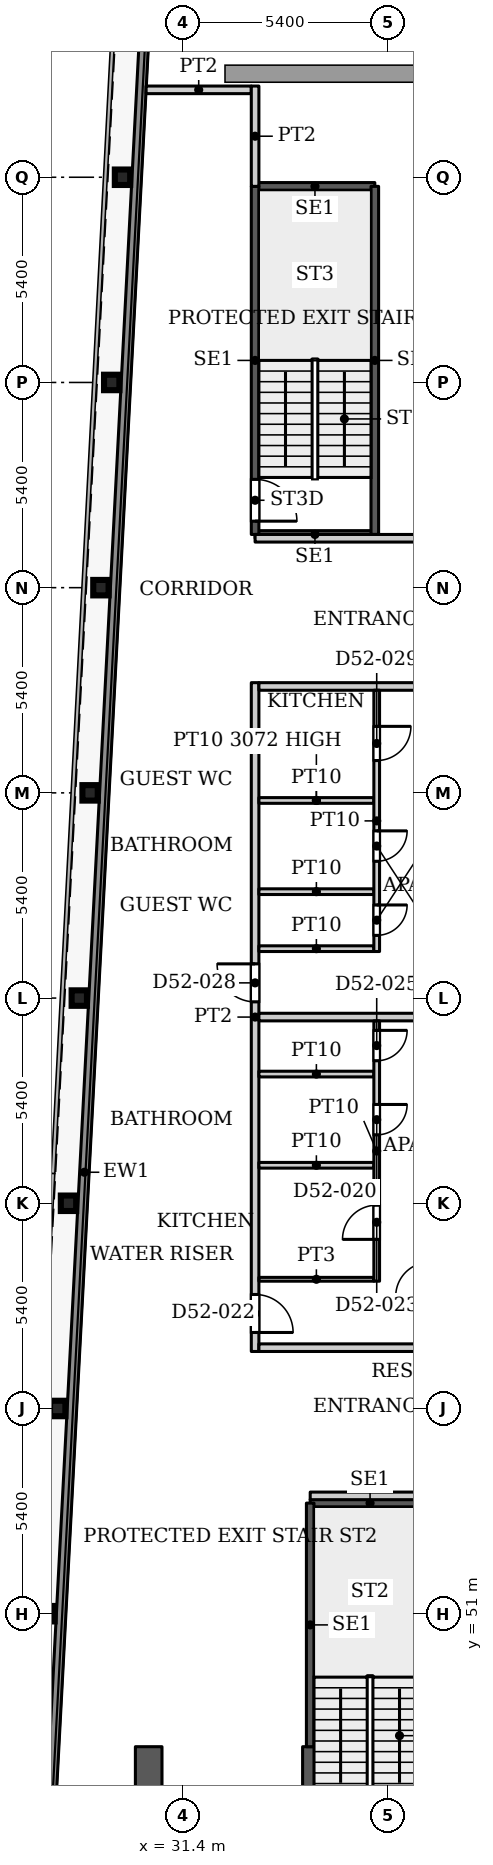
"""IFC4 building model, lengths in metres.
Left out: names, types, materials, properties, quantities, classifications, styles, units other than length and angle.
Written with IfcOpenShell. Run it as: python <this file> out.ifc"""

import sys

from ifc_helpers import new_model, si_unit, direction, frame, frame_2d, origin, origin_2d, place, context, subcontext, project, spatial, rectangle, i_section, extrude, source, transform, mapped, element, fill, save


model = new_model("IFC4")
c1 = context("Model", 3, precision=1e-05, world=origin(), true_north=direction((0.0, 1.0)))
c2 = subcontext(c1, "Body", "Model", "MODEL_VIEW")
j1 = project(units=[si_unit("LENGTHUNIT", "METRE"), si_unit("PLANEANGLEUNIT", "RADIAN")], contexts=[c1])
p1 = place(None, origin())
s1 = spatial("IfcSite", under=j1, at=p1, CompositionType="ELEMENT")
p2 = place(p1, origin())
s2 = spatial("IfcBuilding", under=s1, at=p2, CompositionType="ELEMENT")
p3 = place(p2, frame((0.0, 0.0, 227.9)))
s3 = spatial("IfcBuildingStorey", under=s2, at=p3, CompositionType="ELEMENT", Elevation=227.9)
for number, where, z_axis, x_axis in (
    (1, (27.822, 51.0, 0.0), (0.0, 0.0, 1.0), (1.0, 0.0, 0.0)),
    (2, (28.106, 56.4, 0.0), (0.0, 0.0, 1.0), (1.0, 0.0, 0.0)),
    (3, (28.39, 61.8, 0.0), (0.0, 0.0, 1.0), (1.0, 0.0, 0.0)),
    (4, (28.674, 67.2, 0.0), (0.0, 0.0, 1.0), (1.0, 0.0, 0.0)),
    (5, (28.958, 72.6, 0.0), (0.0, 0.0, 1.0), (1.0, 0.0, 0.0)),
    (6, (29.243, 78.0, 0.0), (0.0, 0.0, 1.0), (1.0, 0.0, 0.0)),
    (7, (29.527, 83.4, 0.0), (0.0, 0.0, 1.0), (1.0, 0.0, 0.0)),
    (8, (29.811, 88.8, 0.0), (0.0, 0.0, 1.0), (1.0, 0.0, 0.0)),
):
    element("IfcColumn", number, at=place(p3, frame(where, z_axis=z_axis, x_axis=x_axis)), inside=s3, PredefinedType="COLUMN", context=c2, shape_type="SweptSolid", body=[
        extrude(i_section(OverallWidth=0.404, OverallDepth=0.407, WebThickness=0.027, FlangeThickness=0.044, FilletRadius=0.012, at=origin_2d()), origin(), (0.0, 0.0, 1.0), 3.9),
    ])
p4 = place(p3, frame((34.75, 29.05, 0.0), z_axis=(0.0, 0.0, 1.0), x_axis=(0.0, 1.0, 0.0)))
e9 = element("IfcWall", 9, at=p4, inside=s3, PredefinedType="SHEAR", context=c2, shape_type="SweptSolid", body=[
    extrude(rectangle(XDim=18.45, YDim=0.4, at=frame_2d((9.225, 0.0))), origin(), (0.0, 0.0, 1.0), 3.9),
])
p5 = place(p4, frame((8.025, 0.0, 0.0)))
e10 = element("IfcOpeningElement", 10, at=p5, cuts=e9, PredefinedType="OPENING", context=c2, shape_type="SweptSolid", body=[
    extrude(rectangle(XDim=1.1, YDim=2.2, at=frame_2d((0.55, 1.1))), frame((0.0, 0.21, 0.0), z_axis=(0.0, -1.0, 0.0), x_axis=(1.0, 0.0, 0.0)), (0.0, 0.0, 1.0), 0.42),
])
p6 = place(p4, frame((10.875, 0.0, 0.0)))
e11 = element("IfcOpeningElement", 11, at=p6, cuts=e9, PredefinedType="OPENING", context=c2, shape_type="SweptSolid", body=[
    extrude(rectangle(XDim=1.1, YDim=2.2, at=frame_2d((0.55, 1.1))), frame((0.0, 0.21, 0.0), z_axis=(0.0, -1.0, 0.0), x_axis=(1.0, 0.0, 0.0)), (0.0, 0.0, 1.0), 0.42),
])
p7 = place(p4, frame((13.725, 0.0, 0.0)))
e12 = element("IfcOpeningElement", 12, at=p7, cuts=e9, PredefinedType="OPENING", context=c2, shape_type="SweptSolid", body=[
    extrude(rectangle(XDim=1.1, YDim=2.2, at=frame_2d((0.55, 1.1))), frame((0.0, 0.21, 0.0), z_axis=(0.0, -1.0, 0.0), x_axis=(1.0, 0.0, 0.0)), (0.0, 0.0, 1.0), 0.42),
])
p8 = place(p4, frame((15.95, 0.0, 0.0)))
e13 = element("IfcOpeningElement", 13, at=p8, cuts=e9, PredefinedType="OPENING", context=c2, shape_type="SweptSolid", body=[
    extrude(rectangle(XDim=1.1, YDim=2.2, at=frame_2d((0.55, 1.1))), frame((0.0, 0.21, 0.0), z_axis=(0.0, -1.0, 0.0), x_axis=(1.0, 0.0, 0.0)), (0.0, 0.0, 1.0), 0.42),
])
p9 = place(p3, frame((30.5, 29.05, 0.0), z_axis=(0.0, 0.0, 1.0), x_axis=(0.0, 1.0, 0.0)))
e14 = element("IfcWall", 14, at=p9, inside=s3, PredefinedType="SHEAR", context=c2, shape_type="SweptSolid", body=[
    extrude(rectangle(XDim=18.45, YDim=0.7, at=frame_2d((9.225, 0.0))), origin(), (0.0, 0.0, 1.0), 3.9),
])
p10 = place(p9, frame((1.5, 0.0, 0.0)))
e15 = element("IfcOpeningElement", 15, at=p10, cuts=e14, PredefinedType="OPENING", context=c2, shape_type="SweptSolid", body=[
    extrude(rectangle(XDim=0.9, YDim=2.2, at=frame_2d((0.45, 1.1))), frame((0.0, 0.36, 0.0), z_axis=(0.0, -1.0, 0.0), x_axis=(1.0, 0.0, 0.0)), (0.0, 0.0, 1.0), 0.72),
])
p11 = place(p9, frame((8.705, 0.0, 0.0)))
e16 = element("IfcOpeningElement", 16, at=p11, cuts=e14, PredefinedType="OPENING", context=c2, shape_type="SweptSolid", body=[
    extrude(rectangle(XDim=0.9, YDim=2.2, at=frame_2d((0.45, 1.1))), frame((0.0, 0.36, 0.0), z_axis=(0.0, -1.0, 0.0), x_axis=(1.0, 0.0, 0.0)), (0.0, 0.0, 1.0), 0.72),
])
p12 = place(p3, frame((27.195, 31.969, 0.0), z_axis=(0.0, 0.0, 1.0), x_axis=(0.052555284099, 0.998618016117, 0.0)))
e17 = element("IfcWall", 17, at=p12, inside=s3, PredefinedType="SOLIDWALL", context=c2, shape_type="SweptSolid", body=[
    extrude(rectangle(XDim=61.38, YDim=0.25, at=frame_2d((30.69, 0.0))), origin(), (0.0, 0.0, 1.0), 3.75),
])
p13 = place(p3, frame((34.75, 53.91, 0.0), z_axis=(0.0, 0.0, 1.0), x_axis=(1.0, 0.0, 0.0)))
e18 = element("IfcWall", 18, at=p13, inside=s3, PredefinedType="SHEAR", context=c2, shape_type="SweptSolid", body=[
    extrude(rectangle(XDim=3.15, YDim=0.2, at=frame_2d((1.575, 0.0))), origin(), (0.0, 0.0, 1.0), 3.9),
])
p14 = place(p3, frame((34.75, 47.5, 0.0), z_axis=(0.0, 0.0, 1.0), x_axis=(0.0, 1.0, 0.0)))
e19 = element("IfcWall", 19, at=p14, inside=s3, PredefinedType="SHEAR", context=c2, shape_type="SweptSolid", body=[
    extrude(rectangle(XDim=6.41, YDim=0.2, at=frame_2d((3.205, 0.0))), origin(), (0.0, 0.0, 1.0), 3.9),
])
for number, where, z_axis, x_axis in (
    (20, (33.3, 79.4, 0.0), (0.0, 0.0, 1.0), (1.0, 0.0, 0.0)),
    (21, (33.3, 88.56, 0.0), (0.0, 0.0, 1.0), (1.0, 0.0, 0.0)),
):
    element("IfcWall", number, at=place(p3, frame(where, z_axis=z_axis, x_axis=x_axis)), inside=s3, PredefinedType="SHEAR", context=c2, shape_type="SweptSolid", body=[
        extrude(rectangle(XDim=3.15, YDim=0.2, at=frame_2d((1.575, 0.0))), origin(), (0.0, 0.0, 1.0), 3.9),
    ])
p15 = place(p3, frame((33.3, 79.4, 0.0), z_axis=(0.0, 0.0, 1.0), x_axis=(0.0, 1.0, 0.0)))
e22 = element("IfcWall", 22, at=p15, inside=s3, PredefinedType="SHEAR", context=c2, shape_type="SweptSolid", body=[
    extrude(rectangle(XDim=9.16, YDim=0.2, at=frame_2d((4.58, 0.0))), origin(), (0.0, 0.0, 1.0), 3.9),
])
p16 = place(p15, frame((0.35, 0.0, 0.0)))
e23 = element("IfcOpeningElement", 23, at=p16, cuts=e22, PredefinedType="OPENING", context=c2, shape_type="SweptSolid", body=[
    extrude(rectangle(XDim=1.1, YDim=2.2, at=frame_2d((0.55, 1.1))), frame((0.0, 0.11, 0.0), z_axis=(0.0, -1.0, 0.0), x_axis=(1.0, 0.0, 0.0)), (0.0, 0.0, 1.0), 0.22),
])
p17 = place(p3, frame((36.45, 79.4, 0.0), z_axis=(0.0, 0.0, 1.0), x_axis=(0.0, 1.0, 0.0)))
e24 = element("IfcWall", 24, at=p17, inside=s3, PredefinedType="SHEAR", context=c2, shape_type="SweptSolid", body=[
    extrude(rectangle(XDim=9.16, YDim=0.2, at=frame_2d((4.58, 0.0))), origin(), (0.0, 0.0, 1.0), 3.9),
])
p18 = place(p3, frame((30.432, 91.1, 0.0), z_axis=(0.0, 0.0, 1.0), x_axis=(1.0, 0.0, 0.0)))
e25 = element("IfcWall", 25, at=p18, inside=s3, PredefinedType="PARTITIONING", context=c2, shape_type="SweptSolid", body=[
    extrude(rectangle(XDim=2.768, YDim=0.2, at=frame_2d((1.384, 0.0))), origin(), (0.0, 0.0, 1.0), 3.6),
])
p19 = place(p3, frame((33.3, 57.9, 0.0), z_axis=(0.0, 0.0, 1.0), x_axis=(0.0, 1.0, 0.0)))
e26 = element("IfcWall", 26, at=p19, inside=s3, PredefinedType="PARTITIONING", context=c2, shape_type="SweptSolid", body=[
    extrude(rectangle(XDim=17.6, YDim=0.2, at=frame_2d((8.8, 0.0))), origin(), (0.0, 0.0, 1.0), 3.6),
])
p20 = place(p19, frame((0.5, 0.0, 0.0)))
e27 = element("IfcOpeningElement", 27, at=p20, cuts=e26, PredefinedType="OPENING", context=c2, shape_type="SweptSolid", body=[
    extrude(rectangle(XDim=1.0, YDim=2.1, at=frame_2d((0.5, 1.05))), frame((0.0, 0.11, 0.0), z_axis=(0.0, -1.0, 0.0), x_axis=(1.0, 0.0, 0.0)), (0.0, 0.0, 1.0), 0.22),
])
p21 = place(p19, frame((9.2, 0.0, 0.0)))
e28 = element("IfcOpeningElement", 28, at=p21, cuts=e26, PredefinedType="OPENING", context=c2, shape_type="SweptSolid", body=[
    extrude(rectangle(XDim=1.0, YDim=2.1, at=frame_2d((0.5, 1.05))), frame((0.0, 0.11, 0.0), z_axis=(0.0, -1.0, 0.0), x_axis=(1.0, 0.0, 0.0)), (0.0, 0.0, 1.0), 0.22),
])
p22 = place(p3, frame((33.3, 79.3, 0.0), z_axis=(0.0, 0.0, 1.0), x_axis=(1.0, 0.0, 0.0)))
e29 = element("IfcWall", 29, at=p22, inside=s3, PredefinedType="PARTITIONING", context=c2, shape_type="SweptSolid", body=[
    extrude(rectangle(XDim=12.6, YDim=0.2, at=frame_2d((6.3, 0.0))), origin(), (0.0, 0.0, 1.0), 3.6),
])
p23 = place(p22, frame((5.795, 0.0, 0.0)))
e30 = element("IfcOpeningElement", 30, at=p23, cuts=e29, PredefinedType="OPENING", context=c2, shape_type="SweptSolid", body=[
    extrude(rectangle(XDim=1.0, YDim=2.1, at=frame_2d((0.5, 1.05))), frame((0.0, 0.11, 0.0), z_axis=(0.0, -1.0, 0.0), x_axis=(1.0, 0.0, 0.0)), (0.0, 0.0, 1.0), 0.22),
])
p24 = place(p3, frame((33.3, 88.56, 0.0), z_axis=(0.0, 0.0, 1.0), x_axis=(0.0, 1.0, 0.0)))
e31 = element("IfcWall", 31, at=p24, inside=s3, PredefinedType="PARTITIONING", context=c2, shape_type="SweptSolid", body=[
    extrude(rectangle(XDim=2.64, YDim=0.2, at=frame_2d((1.32, 0.0))), origin(), (0.0, 0.0, 1.0), 3.6),
])
p25 = place(p3, frame((33.4, 58.0, 0.0), z_axis=(0.0, 0.0, 1.0), x_axis=(1.0, 0.0, 0.0)))
e32 = element("IfcWall", 32, at=p25, inside=s3, PredefinedType="PARTITIONING", context=c2, shape_type="SweptSolid", body=[
    extrude(rectangle(XDim=12.5, YDim=0.2, at=frame_2d((6.25, 0.0))), origin(), (0.0, 0.0, 1.0), 3.6),
])
p26 = place(p3, frame((33.4, 59.8, 0.0), z_axis=(0.0, 0.0, 1.0), x_axis=(1.0, 0.0, 0.0)))
e33 = element("IfcWall", 33, at=p26, inside=s3, PredefinedType="PARTITIONING", context=c2, shape_type="SweptSolid", body=[
    extrude(rectangle(XDim=3.025, YDim=0.1, at=frame_2d((1.513, 0.0))), origin(), (0.0, 0.0, 1.0), 3.6),
])
for number, where, z_axis, x_axis in (
    (34, (33.4, 62.8, 0.0), (0.0, 0.0, 1.0), (1.0, 0.0, 0.0)),
    (35, (33.4, 65.2, 0.0), (0.0, 0.0, 1.0), (1.0, 0.0, 0.0)),
):
    element("IfcWall", number, at=place(p3, frame(where, z_axis=z_axis, x_axis=x_axis)), inside=s3, PredefinedType="PARTITIONING", context=c2, shape_type="SweptSolid", body=[
        extrude(rectangle(XDim=3.025, YDim=0.15, at=frame_2d((1.513, 0.0))), origin(), (0.0, 0.0, 1.0), 3.6),
    ])
p27 = place(p3, frame((33.4, 66.7, 0.0), z_axis=(0.0, 0.0, 1.0), x_axis=(1.0, 0.0, 0.0)))
e36 = element("IfcWall", 36, at=p27, inside=s3, PredefinedType="PARTITIONING", context=c2, shape_type="SweptSolid", body=[
    extrude(rectangle(XDim=12.5, YDim=0.2, at=frame_2d((6.25, 0.0))), origin(), (0.0, 0.0, 1.0), 3.6),
])
for number, where, z_axis, x_axis in (
    (37, (33.4, 68.5, 0.0), (0.0, 0.0, 1.0), (1.0, 0.0, 0.0)),
    (38, (33.4, 70.0, 0.0), (0.0, 0.0, 1.0), (1.0, 0.0, 0.0)),
):
    element("IfcWall", number, at=place(p3, frame(where, z_axis=z_axis, x_axis=x_axis)), inside=s3, PredefinedType="PARTITIONING", context=c2, shape_type="SweptSolid", body=[
        extrude(rectangle(XDim=3.025, YDim=0.15, at=frame_2d((1.513, 0.0))), origin(), (0.0, 0.0, 1.0), 3.6),
    ])
p28 = place(p3, frame((33.4, 72.4, 0.0), z_axis=(0.0, 0.0, 1.0), x_axis=(1.0, 0.0, 0.0)))
e39 = element("IfcWall", 39, at=p28, inside=s3, PredefinedType="PARTITIONING", context=c2, shape_type="SweptSolid", body=[
    extrude(rectangle(XDim=3.025, YDim=0.15, at=frame_2d((1.513, 0.0))), origin(), (0.0, 0.0, 1.0), 3.072),
])
p29 = place(p3, frame((33.4, 75.4, 0.0), z_axis=(0.0, 0.0, 1.0), x_axis=(1.0, 0.0, 0.0)))
e40 = element("IfcWall", 40, at=p29, inside=s3, PredefinedType="PARTITIONING", context=c2, shape_type="SweptSolid", body=[
    extrude(rectangle(XDim=12.5, YDim=0.2, at=frame_2d((6.25, 0.0))), origin(), (0.0, 0.0, 1.0), 3.6),
])
p30 = place(p3, frame((34.75, 54.1, 0.0), z_axis=(0.0, 0.0, 1.0), x_axis=(1.0, 0.0, 0.0)))
e41 = element("IfcWall", 41, at=p30, inside=s3, PredefinedType="PARTITIONING", context=c2, shape_type="SweptSolid", body=[
    extrude(rectangle(XDim=11.15, YDim=0.2, at=frame_2d((5.575, 0.0))), origin(), (0.0, 0.0, 1.0), 3.6),
])
p31 = place(p30, frame((5.075, 0.0, 0.0)))
e42 = element("IfcOpeningElement", 42, at=p31, cuts=e41, PredefinedType="OPENING", context=c2, shape_type="SweptSolid", body=[
    extrude(rectangle(XDim=1.0, YDim=2.1, at=frame_2d((0.5, 1.05))), frame((0.0, 0.11, 0.0), z_axis=(0.0, -1.0, 0.0), x_axis=(1.0, 0.0, 0.0)), (0.0, 0.0, 1.0), 0.22),
])
p32 = place(p3, frame((36.5, 59.75, 0.0), z_axis=(0.0, 0.0, 1.0), x_axis=(0.0, 1.0, 0.0)))
e43 = element("IfcWall", 43, at=p32, inside=s3, PredefinedType="PARTITIONING", context=c2, shape_type="SweptSolid", body=[
    extrude(rectangle(XDim=6.85, YDim=0.15, at=frame_2d((3.425, 0.0))), origin(), (0.0, 0.0, 1.0), 3.6),
])
p33 = place(p32, frame((3.85, 0.0, 0.0)))
e44 = element("IfcOpeningElement", 44, at=p33, cuts=e43, PredefinedType="OPENING", context=c2, shape_type="SweptSolid", body=[
    extrude(rectangle(XDim=0.8, YDim=2.1, at=frame_2d((0.4, 1.05))), frame((0.0, 0.085, 0.0), z_axis=(0.0, -1.0, 0.0), x_axis=(1.0, 0.0, 0.0)), (0.0, 0.0, 1.0), 0.17),
])
p34 = place(p32, frame((1.1, 0.0, 0.0)))
e45 = element("IfcOpeningElement", 45, at=p34, cuts=e43, PredefinedType="OPENING", context=c2, shape_type="SweptSolid", body=[
    extrude(rectangle(XDim=0.9, YDim=2.1, at=frame_2d((0.45, 1.05))), frame((0.0, 0.085, 0.0), z_axis=(0.0, -1.0, 0.0), x_axis=(1.0, 0.0, 0.0)), (0.0, 0.0, 1.0), 0.17),
])
p35 = place(p32, frame((5.8, 0.0, 0.0)))
e46 = element("IfcOpeningElement", 46, at=p35, cuts=e43, PredefinedType="OPENING", context=c2, shape_type="SweptSolid", body=[
    extrude(rectangle(XDim=0.8, YDim=2.1, at=frame_2d((0.4, 1.05))), frame((0.0, 0.085, 0.0), z_axis=(0.0, -1.0, 0.0), x_axis=(1.0, 0.0, 0.0)), (0.0, 0.0, 1.0), 0.17),
])
p36 = place(p3, frame((36.5, 68.425, 0.0), z_axis=(0.0, 0.0, 1.0), x_axis=(0.0, 1.0, 0.0)))
e47 = element("IfcWall", 47, at=p36, inside=s3, PredefinedType="PARTITIONING", context=c2, shape_type="SweptSolid", body=[
    extrude(rectangle(XDim=6.875, YDim=0.15, at=frame_2d((3.438, 0.0))), origin(), (0.0, 0.0, 1.0), 3.6),
])
p37 = place(p36, frame((2.375, 0.0, 0.0)))
e48 = element("IfcOpeningElement", 48, at=p37, cuts=e47, PredefinedType="OPENING", context=c2, shape_type="SweptSolid", body=[
    extrude(rectangle(XDim=0.8, YDim=2.1, at=frame_2d((0.4, 1.05))), frame((0.0, 0.085, 0.0), z_axis=(0.0, -1.0, 0.0), x_axis=(1.0, 0.0, 0.0)), (0.0, 0.0, 1.0), 0.17),
])
p38 = place(p36, frame((5.025, 0.0, 0.0)))
e49 = element("IfcOpeningElement", 49, at=p38, cuts=e47, PredefinedType="OPENING", context=c2, shape_type="SweptSolid", body=[
    extrude(rectangle(XDim=0.9, YDim=2.1, at=frame_2d((0.45, 1.05))), frame((0.0, 0.085, 0.0), z_axis=(0.0, -1.0, 0.0), x_axis=(1.0, 0.0, 0.0)), (0.0, 0.0, 1.0), 0.17),
])
p39 = place(p36, frame((0.425, 0.0, 0.0)))
e50 = element("IfcOpeningElement", 50, at=p39, cuts=e47, PredefinedType="OPENING", context=c2, shape_type="SweptSolid", body=[
    extrude(rectangle(XDim=0.8, YDim=2.1, at=frame_2d((0.4, 1.05))), frame((0.0, 0.085, 0.0), z_axis=(0.0, -1.0, 0.0), x_axis=(1.0, 0.0, 0.0)), (0.0, 0.0, 1.0), 0.17),
])
m1 = source(origin(), c2, "Body", "SweptSolid", [
    extrude(rectangle(XDim=1.1, YDim=2.2, at=frame_2d((0.55, 1.1))), frame((0.0, 0.025, 0.0), z_axis=(0.0, -1.0, 0.0), x_axis=(1.0, 0.0, 0.0)), (0.0, 0.0, 1.0), 0.05),
])
p40 = place(p16, origin())
e51 = element("IfcDoor", 51, at=p40, inside=s3, OperationType="SINGLE_SWING_RIGHT", PredefinedType="DOOR", context=c2, shape_type="MappedRepresentation", body=[
    mapped(m1, transform((0.0, 0.0, 0.0), x_axis=(1.0, 0.0, 0.0), y_axis=(0.0, 1.0, 0.0), z_axis=(0.0, 0.0, 1.0), scale=1.0)),
])
fill(e23, e51)
m2 = source(origin(), c2, "Body", "SweptSolid", [
    extrude(rectangle(XDim=0.8, YDim=2.1, at=frame_2d((0.4, 1.05))), frame((0.0, 0.025, 0.0), z_axis=(0.0, -1.0, 0.0), x_axis=(1.0, 0.0, 0.0)), (0.0, 0.0, 1.0), 0.05),
])
p41 = place(p33, origin())
e52 = element("IfcDoor", 52, at=p41, inside=s3, OperationType="SINGLE_SWING_RIGHT", PredefinedType="DOOR", context=c2, shape_type="MappedRepresentation", body=[
    mapped(m2, transform((0.0, 0.0, 0.0), x_axis=(1.0, 0.0, 0.0), y_axis=(0.0, 1.0, 0.0), z_axis=(0.0, 0.0, 1.0), scale=1.0)),
])
fill(e44, e52)
m3 = source(origin(), c2, "Body", "SweptSolid", [
    extrude(rectangle(XDim=1.0, YDim=2.1, at=frame_2d((0.5, 1.05))), frame((0.0, 0.025, 0.0), z_axis=(0.0, -1.0, 0.0), x_axis=(1.0, 0.0, 0.0)), (0.0, 0.0, 1.0), 0.05),
])
p42 = place(p20, origin())
e53 = element("IfcDoor", 53, at=p42, inside=s3, OperationType="SINGLE_SWING_RIGHT", PredefinedType="DOOR", context=c2, shape_type="MappedRepresentation", body=[
    mapped(m3, transform((0.0, 0.0, 0.0), x_axis=(1.0, 0.0, 0.0), y_axis=(0.0, 1.0, 0.0), z_axis=(0.0, 0.0, 1.0), scale=1.0)),
])
fill(e27, e53)
m4 = source(origin(), c2, "Body", "SweptSolid", [
    extrude(rectangle(XDim=0.9, YDim=2.1, at=frame_2d((0.45, 1.05))), frame((0.0, 0.025, 0.0), z_axis=(0.0, -1.0, 0.0), x_axis=(1.0, 0.0, 0.0)), (0.0, 0.0, 1.0), 0.05),
])
p43 = place(p34, origin())
e54 = element("IfcDoor", 54, at=p43, inside=s3, OperationType="SINGLE_SWING_LEFT", PredefinedType="DOOR", context=c2, shape_type="MappedRepresentation", body=[
    mapped(m4, transform((0.0, 0.0, 0.0), x_axis=(1.0, 0.0, 0.0), y_axis=(0.0, 1.0, 0.0), z_axis=(0.0, 0.0, 1.0), scale=1.0)),
])
fill(e45, e54)
p44 = place(p35, origin())
e55 = element("IfcDoor", 55, at=p44, inside=s3, OperationType="SINGLE_SWING_RIGHT", PredefinedType="DOOR", context=c2, shape_type="MappedRepresentation", body=[
    mapped(m2, transform((0.0, 0.0, 0.0), x_axis=(1.0, 0.0, 0.0), y_axis=(0.0, 1.0, 0.0), z_axis=(0.0, 0.0, 1.0), scale=1.0)),
])
fill(e46, e55)
p45 = place(p37, origin())
e56 = element("IfcDoor", 56, at=p45, inside=s3, OperationType="SINGLE_SWING_RIGHT", PredefinedType="DOOR", context=c2, shape_type="MappedRepresentation", body=[
    mapped(m2, transform((0.0, 0.0, 0.0), x_axis=(1.0, 0.0, 0.0), y_axis=(0.0, 1.0, 0.0), z_axis=(0.0, 0.0, 1.0), scale=1.0)),
])
fill(e48, e56)
p46 = place(p21, origin())
e57 = element("IfcDoor", 57, at=p46, inside=s3, OperationType="SINGLE_SWING_LEFT", PredefinedType="DOOR", context=c2, shape_type="MappedRepresentation", body=[
    mapped(m3, transform((0.0, 0.0, 0.0), x_axis=(1.0, 0.0, 0.0), y_axis=(0.0, 1.0, 0.0), z_axis=(0.0, 0.0, 1.0), scale=1.0)),
])
fill(e28, e57)
p47 = place(p38, origin())
e58 = element("IfcDoor", 58, at=p47, inside=s3, OperationType="SINGLE_SWING_RIGHT", PredefinedType="DOOR", context=c2, shape_type="MappedRepresentation", body=[
    mapped(m4, transform((0.0, 0.0, 0.0), x_axis=(1.0, 0.0, 0.0), y_axis=(0.0, 1.0, 0.0), z_axis=(0.0, 0.0, 1.0), scale=1.0)),
])
fill(e49, e58)
p48 = place(p39, origin())
e59 = element("IfcDoor", 59, at=p48, inside=s3, OperationType="SINGLE_SWING_RIGHT", PredefinedType="DOOR", context=c2, shape_type="MappedRepresentation", body=[
    mapped(m2, transform((0.0, 0.0, 0.0), x_axis=(1.0, 0.0, 0.0), y_axis=(0.0, 1.0, 0.0), z_axis=(0.0, 0.0, 1.0), scale=1.0)),
])
fill(e50, e59)
save(model, sys.argv[1])
